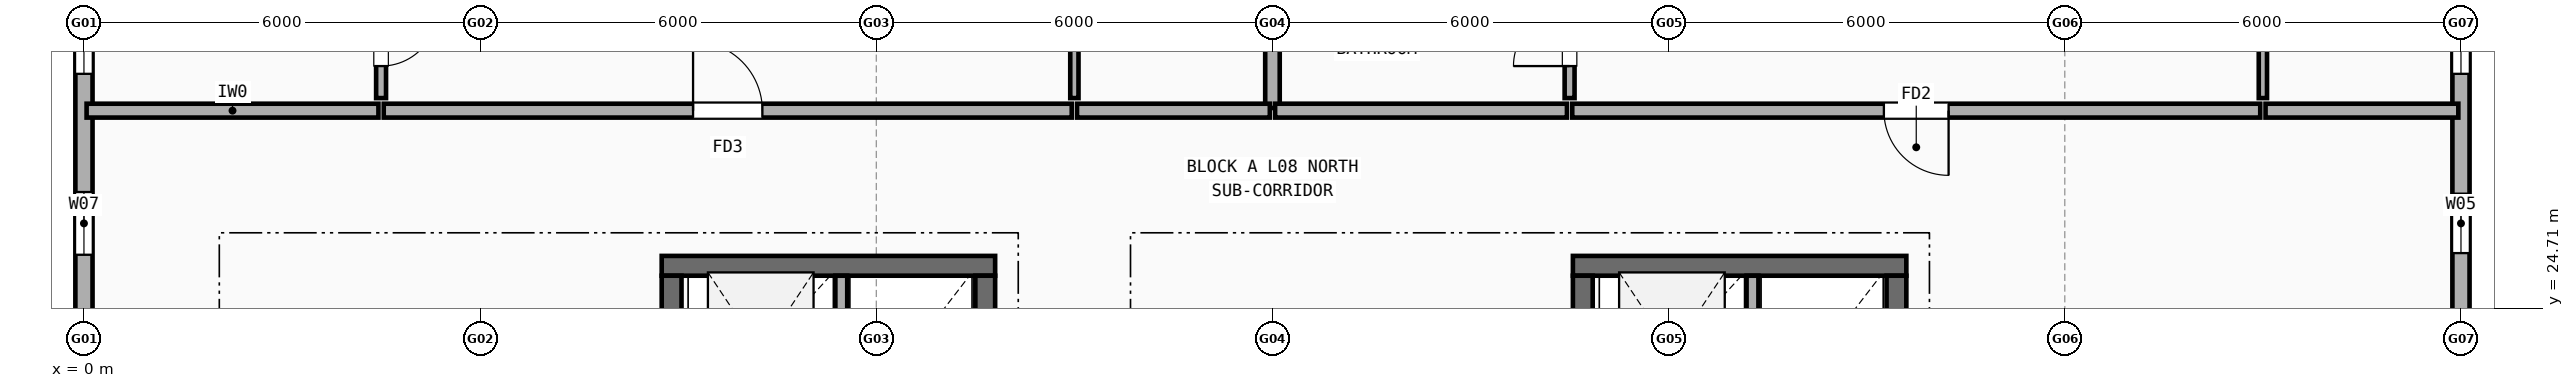
"""IFC4 building model, lengths in metres.
Left out: names, types, materials, properties, quantities, classifications, styles, units other than length and angle.
Written with IfcOpenShell. Run it as: python <this file> out.ifc"""

import sys

from ifc_helpers import new_model, si_unit, direction, frame, frame_2d, origin, place, context, subcontext, project, spatial, rectangle, extrude, element, fill, save


model = new_model("IFC4")
c1 = context("Model", 3, precision=1e-05, world=origin(), true_north=direction((0.0, 1.0)))
c2 = subcontext(c1, "Body", "Model", "MODEL_VIEW")
j1 = project(units=[si_unit("LENGTHUNIT", "METRE"), si_unit("PLANEANGLEUNIT", "RADIAN")], contexts=[c1])
p1 = place(None, origin())
s1 = spatial("IfcSite", under=j1, at=p1, CompositionType="ELEMENT")
p2 = place(p1, origin())
s2 = spatial("IfcBuilding", under=s1, at=p2, CompositionType="ELEMENT")
p3 = place(p2, frame((0.0, 0.0, 26.9)))
s3 = spatial("IfcBuildingStorey", under=s2, at=p3, CompositionType="ELEMENT", Elevation=26.9)
p4 = place(p3, frame((36.0, 24.325, 0.0), z_axis=(0.0, 0.0, 1.0), x_axis=(0.0, 1.0, 0.0)))
e1 = element("IfcWall", 1, at=p4, inside=s3, PredefinedType="STANDARD", context=c2, shape_type="SweptSolid", body=[
    extrude(rectangle(XDim=5.35, YDim=0.26, at=frame_2d((2.675, 0.0))), origin(), (0.0, 0.0, 1.0), 2.462),
])
p5 = place(p4, frame((1.218, 0.0, 0.9)))
e2 = element("IfcOpeningElement", 2, at=p5, cuts=e1, PredefinedType="OPENING", context=c2, shape_type="SweptSolid", body=[
    extrude(rectangle(XDim=0.9, YDim=1.4, at=frame_2d((0.45, 0.7))), frame((0.0, 0.14, 0.0), z_axis=(0.0, -1.0, 0.0), x_axis=(1.0, 0.0, 0.0)), (0.0, 0.0, 1.0), 0.28),
])
p6 = place(p4, frame((3.933, 0.0, 0.9)))
e3 = element("IfcOpeningElement", 3, at=p6, cuts=e1, PredefinedType="OPENING", context=c2, shape_type="SweptSolid", body=[
    extrude(rectangle(XDim=0.9, YDim=1.4, at=frame_2d((0.45, 0.7))), frame((0.0, 0.14, 0.0), z_axis=(0.0, -1.0, 0.0), x_axis=(1.0, 0.0, 0.0)), (0.0, 0.0, 1.0), 0.28),
])
p7 = place(p3, frame((0.0, 29.675, 0.0), z_axis=(0.0, 0.0, 1.0), x_axis=(0.0, -1.0, 0.0)))
e4 = element("IfcWall", 4, at=p7, inside=s3, PredefinedType="STANDARD", context=c2, shape_type="SweptSolid", body=[
    extrude(rectangle(XDim=5.35, YDim=0.26, at=frame_2d((2.675, 0.0))), origin(), (0.0, 0.0, 1.0), 2.462),
])
p8 = place(p7, frame((0.518, 0.0, 0.9)))
e5 = element("IfcOpeningElement", 5, at=p8, cuts=e4, PredefinedType="OPENING", context=c2, shape_type="SweptSolid", body=[
    extrude(rectangle(XDim=0.9, YDim=1.3, at=frame_2d((0.45, 0.65))), frame((0.0, 0.14, 0.0), z_axis=(0.0, -1.0, 0.0), x_axis=(1.0, 0.0, 0.0)), (0.0, 0.0, 1.0), 0.28),
])
p9 = place(p7, frame((3.208, 0.0, 0.9)))
e6 = element("IfcOpeningElement", 6, at=p9, cuts=e4, PredefinedType="OPENING", context=c2, shape_type="SweptSolid", body=[
    extrude(rectangle(XDim=0.95, YDim=1.35, at=frame_2d((0.475, 0.675))), frame((0.0, 0.14, 0.0), z_axis=(0.0, -1.0, 0.0), x_axis=(1.0, 0.0, 0.0)), (0.0, 0.0, 1.0), 0.28),
])
p10 = place(p3, frame((13.8, 25.35, 0.0), z_axis=(0.0, 0.0, 1.0), x_axis=(-1.0, 0.0, 0.0)))
e7 = element("IfcWall", 7, at=p10, inside=s3, PredefinedType="SHEAR", context=c2, shape_type="SweptSolid", body=[
    extrude(rectangle(XDim=5.05, YDim=0.3, at=frame_2d((2.525, 0.0))), origin(), (0.0, 0.0, 1.0), 2.98),
])
p11 = place(p3, frame((13.65, 18.75, 0.0), z_axis=(0.0, 0.0, 1.0), x_axis=(0.0, 1.0, 0.0)))
e8 = element("IfcWall", 8, at=p11, inside=s3, PredefinedType="SHEAR", context=c2, shape_type="SweptSolid", body=[
    extrude(rectangle(XDim=6.45, YDim=0.3, at=frame_2d((3.225, 0.0))), origin(), (0.0, 0.0, 1.0), 2.98),
])
p12 = place(p3, frame((8.9, 21.75, 0.0), z_axis=(0.0, 0.0, 1.0), x_axis=(0.0, 1.0, 0.0)))
e9 = element("IfcWall", 9, at=p12, inside=s3, PredefinedType="SHEAR", context=c2, shape_type="SweptSolid", body=[
    extrude(rectangle(XDim=3.45, YDim=0.3, at=frame_2d((1.725, 0.0))), origin(), (0.0, 0.0, 1.0), 2.98),
])
p13 = place(p3, frame((11.47, 22.94, 0.0), z_axis=(0.0, 0.0, 1.0), x_axis=(0.0, 1.0, 0.0)))
e10 = element("IfcWall", 10, at=p13, inside=s3, PredefinedType="SOLIDWALL", context=c2, shape_type="SweptSolid", body=[
    extrude(rectangle(XDim=2.26, YDim=0.18, at=frame_2d((1.13, 0.0))), origin(), (0.0, 0.0, 1.0), 2.98),
])
p14 = place(p3, frame((27.6, 25.35, 0.0), z_axis=(0.0, 0.0, 1.0), x_axis=(-1.0, 0.0, 0.0)))
e11 = element("IfcWall", 11, at=p14, inside=s3, PredefinedType="SHEAR", context=c2, shape_type="SweptSolid", body=[
    extrude(rectangle(XDim=5.05, YDim=0.3, at=frame_2d((2.525, 0.0))), origin(), (0.0, 0.0, 1.0), 2.98),
])
p15 = place(p3, frame((27.45, 18.75, 0.0), z_axis=(0.0, 0.0, 1.0), x_axis=(0.0, 1.0, 0.0)))
e12 = element("IfcWall", 12, at=p15, inside=s3, PredefinedType="SHEAR", context=c2, shape_type="SweptSolid", body=[
    extrude(rectangle(XDim=6.45, YDim=0.3, at=frame_2d((3.225, 0.0))), origin(), (0.0, 0.0, 1.0), 2.98),
])
p16 = place(p3, frame((22.7, 21.75, 0.0), z_axis=(0.0, 0.0, 1.0), x_axis=(0.0, 1.0, 0.0)))
e13 = element("IfcWall", 13, at=p16, inside=s3, PredefinedType="SHEAR", context=c2, shape_type="SweptSolid", body=[
    extrude(rectangle(XDim=3.45, YDim=0.3, at=frame_2d((1.725, 0.0))), origin(), (0.0, 0.0, 1.0), 2.98),
])
p17 = place(p3, frame((25.27, 22.94, 0.0), z_axis=(0.0, 0.0, 1.0), x_axis=(0.0, 1.0, 0.0)))
e14 = element("IfcWall", 14, at=p17, inside=s3, PredefinedType="SOLIDWALL", context=c2, shape_type="SweptSolid", body=[
    extrude(rectangle(XDim=2.26, YDim=0.18, at=frame_2d((1.13, 0.0))), origin(), (0.0, 0.0, 1.0), 2.98),
])
p18 = place(p3, frame((18.0, 27.74, 0.0), z_axis=(0.0, 0.0, 1.0), x_axis=(0.0, 1.0, 0.0)))
e15 = element("IfcWall", 15, at=p18, inside=s3, PredefinedType="SOLIDWALL", context=c2, shape_type="SweptSolid", body=[
    extrude(rectangle(XDim=7.87, YDim=0.22, at=frame_2d((3.935, 0.0))), origin(), (0.0, 0.0, 1.0), 2.458),
])
p19 = place(p3, frame((0.04, 27.7, 0.0), z_axis=(0.0, 0.0, 1.0), x_axis=(1.0, 0.0, 0.0)))
e16 = element("IfcWall", 16, at=p19, inside=s3, PredefinedType="SOLIDWALL", context=c2, shape_type="SweptSolid", body=[
    extrude(rectangle(XDim=4.42, YDim=0.21, at=frame_2d((2.21, 0.0))), origin(), (0.0, 0.0, 1.0), 2.462),
])
p20 = place(p3, frame((4.54, 27.7, 0.0), z_axis=(0.0, 0.0, 1.0), x_axis=(1.0, 0.0, 0.0)))
e17 = element("IfcWall", 17, at=p20, inside=s3, PredefinedType="SOLIDWALL", context=c2, shape_type="SweptSolid", body=[
    extrude(rectangle(XDim=10.42, YDim=0.21, at=frame_2d((5.21, 0.0))), origin(), (0.0, 0.0, 1.0), 2.508),
])
p21 = place(p20, frame((4.685, 0.0, 0.0)))
e18 = element("IfcOpeningElement", 18, at=p21, cuts=e17, PredefinedType="OPENING", context=c2, shape_type="SweptSolid", body=[
    extrude(rectangle(XDim=1.05, YDim=2.15, at=frame_2d((0.525, 1.075))), frame((0.0, 0.115, 0.0), z_axis=(0.0, -1.0, 0.0), x_axis=(1.0, 0.0, 0.0)), (0.0, 0.0, 1.0), 0.23),
])
p22 = place(p3, frame((4.5, 27.89, 0.0), z_axis=(0.0, 0.0, 1.0), x_axis=(0.0, 1.0, 0.0)))
e19 = element("IfcWall", 19, at=p22, inside=s3, PredefinedType="PARTITIONING", context=c2, shape_type="SweptSolid", body=[
    extrude(rectangle(XDim=1.82, YDim=0.15, at=frame_2d((0.91, 0.0))), origin(), (0.0, 0.0, 1.0), 2.98),
])
p23 = place(p22, frame((0.485, 0.0, 0.0)))
e20 = element("IfcOpeningElement", 20, at=p23, cuts=e19, PredefinedType="OPENING", context=c2, shape_type="SweptSolid", body=[
    extrude(rectangle(XDim=0.85, YDim=2.1, at=frame_2d((0.425, 1.05))), frame((0.0, 0.085, 0.0), z_axis=(0.0, -1.0, 0.0), x_axis=(1.0, 0.0, 0.0)), (0.0, 0.0, 1.0), 0.17),
])
p24 = place(p3, frame((15.04, 27.7, 0.0), z_axis=(0.0, 0.0, 1.0), x_axis=(1.0, 0.0, 0.0)))
e21 = element("IfcWall", 21, at=p24, inside=s3, PredefinedType="SOLIDWALL", context=c2, shape_type="SweptSolid", body=[
    extrude(rectangle(XDim=2.92, YDim=0.21, at=frame_2d((1.46, 0.0))), origin(), (0.0, 0.0, 1.0), 2.98),
])
p25 = place(p3, frame((15.0, 27.89, 0.0), z_axis=(0.0, 0.0, 1.0), x_axis=(0.0, 1.0, 0.0)))
e22 = element("IfcWall", 22, at=p25, inside=s3, PredefinedType="PARTITIONING", context=c2, shape_type="SweptSolid", body=[
    extrude(rectangle(XDim=7.92, YDim=0.125, at=frame_2d((3.96, 0.0))), origin(), (0.0, 0.0, 1.0), 2.462),
])
p26 = place(p25, frame((3.65, 0.0, 0.0)))
e23 = element("IfcOpeningElement", 23, at=p26, cuts=e22, PredefinedType="OPENING", context=c2, shape_type="SweptSolid", body=[
    extrude(rectangle(XDim=0.88, YDim=2.1, at=frame_2d((0.44, 1.05))), frame((0.0, 0.073, 0.0), z_axis=(0.0, -1.0, 0.0), x_axis=(1.0, 0.0, 0.0)), (0.0, 0.0, 1.0), 0.145),
])
p27 = place(p3, frame((18.04, 27.7, 0.0), z_axis=(0.0, 0.0, 1.0), x_axis=(1.0, 0.0, 0.0)))
e24 = element("IfcWall", 24, at=p27, inside=s3, PredefinedType="SOLIDWALL", context=c2, shape_type="SweptSolid", body=[
    extrude(rectangle(XDim=4.42, YDim=0.21, at=frame_2d((2.21, 0.0))), origin(), (0.0, 0.0, 1.0), 2.98),
])
p28 = place(p3, frame((22.54, 27.7, 0.0), z_axis=(0.0, 0.0, 1.0), x_axis=(1.0, 0.0, 0.0)))
e25 = element("IfcWall", 25, at=p28, inside=s3, PredefinedType="SOLIDWALL", context=c2, shape_type="SweptSolid", body=[
    extrude(rectangle(XDim=10.42, YDim=0.21, at=frame_2d((5.21, 0.0))), origin(), (0.0, 0.0, 1.0), 2.462),
])
p29 = place(p28, frame((4.72, 0.0, 0.0)))
e26 = element("IfcOpeningElement", 26, at=p29, cuts=e25, PredefinedType="OPENING", context=c2, shape_type="SweptSolid", body=[
    extrude(rectangle(XDim=0.98, YDim=2.15, at=frame_2d((0.49, 1.075))), frame((0.0, 0.115, 0.0), z_axis=(0.0, -1.0, 0.0), x_axis=(1.0, 0.0, 0.0)), (0.0, 0.0, 1.0), 0.23),
])
p30 = place(p3, frame((22.5, 27.89, 0.0), z_axis=(0.0, 0.0, 1.0), x_axis=(0.0, 1.0, 0.0)))
e27 = element("IfcWall", 27, at=p30, inside=s3, PredefinedType="PARTITIONING", context=c2, shape_type="SweptSolid", body=[
    extrude(rectangle(XDim=1.82, YDim=0.15, at=frame_2d((0.91, 0.0))), origin(), (0.0, 0.0, 1.0), 2.98),
])
p31 = place(p30, frame((0.485, 0.0, 0.0)))
e28 = element("IfcOpeningElement", 28, at=p31, cuts=e27, PredefinedType="OPENING", context=c2, shape_type="SweptSolid", body=[
    extrude(rectangle(XDim=0.85, YDim=2.1, at=frame_2d((0.425, 1.05))), frame((0.0, 0.085, 0.0), z_axis=(0.0, -1.0, 0.0), x_axis=(1.0, 0.0, 0.0)), (0.0, 0.0, 1.0), 0.17),
])
p32 = place(p3, frame((33.04, 27.7, 0.0), z_axis=(0.0, 0.0, 1.0), x_axis=(1.0, 0.0, 0.0)))
e29 = element("IfcWall", 29, at=p32, inside=s3, PredefinedType="SOLIDWALL", context=c2, shape_type="SweptSolid", body=[
    extrude(rectangle(XDim=2.92, YDim=0.21, at=frame_2d((1.46, 0.0))), origin(), (0.0, 0.0, 1.0), 2.462),
])
p33 = place(p3, frame((33.0, 27.89, 0.0), z_axis=(0.0, 0.0, 1.0), x_axis=(0.0, 1.0, 0.0)))
e30 = element("IfcWall", 30, at=p33, inside=s3, PredefinedType="PARTITIONING", context=c2, shape_type="SweptSolid", body=[
    extrude(rectangle(XDim=7.92, YDim=0.125, at=frame_2d((3.96, 0.0))), origin(), (0.0, 0.0, 1.0), 2.462),
])
p34 = place(p33, frame((3.65, 0.0, 0.0)))
e31 = element("IfcOpeningElement", 31, at=p34, cuts=e30, PredefinedType="OPENING", context=c2, shape_type="SweptSolid", body=[
    extrude(rectangle(XDim=0.9, YDim=2.1, at=frame_2d((0.45, 1.05))), frame((0.0, 0.073, 0.0), z_axis=(0.0, -1.0, 0.0), x_axis=(1.0, 0.0, 0.0)), (0.0, 0.0, 1.0), 0.145),
])
p35 = place(p5, origin())
e32 = element("IfcWindow", 32, at=p35, inside=s3, PartitioningType="SINGLE_PANEL", PredefinedType="WINDOW", context=c2, shape_type="SweptSolid", body=[
    extrude(rectangle(XDim=0.9, YDim=1.4, at=frame_2d((0.45, 0.7))), frame((0.0, 0.03, 0.0), z_axis=(0.0, -1.0, 0.0), x_axis=(1.0, 0.0, 0.0)), (0.0, 0.0, 1.0), 0.06),
])
fill(e2, e32)
p36 = place(p6, origin())
e33 = element("IfcWindow", 33, at=p36, inside=s3, PartitioningType="SINGLE_PANEL", PredefinedType="WINDOW", context=c2, shape_type="SweptSolid", body=[
    extrude(rectangle(XDim=0.9, YDim=1.4, at=frame_2d((0.45, 0.7))), frame((0.0, 0.03, 0.0), z_axis=(0.0, -1.0, 0.0), x_axis=(1.0, 0.0, 0.0)), (0.0, 0.0, 1.0), 0.06),
])
fill(e3, e33)
p37 = place(p8, origin())
e34 = element("IfcWindow", 34, at=p37, inside=s3, PartitioningType="SINGLE_PANEL", PredefinedType="WINDOW", context=c2, shape_type="SweptSolid", body=[
    extrude(rectangle(XDim=0.9, YDim=1.3, at=frame_2d((0.45, 0.65))), frame((0.0, 0.03, 0.0), z_axis=(0.0, -1.0, 0.0), x_axis=(1.0, 0.0, 0.0)), (0.0, 0.0, 1.0), 0.06),
])
fill(e5, e34)
p38 = place(p9, origin())
e35 = element("IfcWindow", 35, at=p38, inside=s3, PartitioningType="SINGLE_PANEL", PredefinedType="WINDOW", context=c2, shape_type="SweptSolid", body=[
    extrude(rectangle(XDim=0.95, YDim=1.35, at=frame_2d((0.475, 0.675))), frame((0.0, 0.03, 0.0), z_axis=(0.0, -1.0, 0.0), x_axis=(1.0, 0.0, 0.0)), (0.0, 0.0, 1.0), 0.06),
])
fill(e6, e35)
p39 = place(p21, origin())
e36 = element("IfcDoor", 36, at=p39, inside=s3, OperationType="SINGLE_SWING_LEFT", PredefinedType="DOOR", context=c2, shape_type="SweptSolid", body=[
    extrude(rectangle(XDim=1.05, YDim=2.15, at=frame_2d((0.525, 1.075))), frame((0.0, 0.025, 0.0), z_axis=(0.0, -1.0, 0.0), x_axis=(1.0, 0.0, 0.0)), (0.0, 0.0, 1.0), 0.05),
])
fill(e18, e36)
p40 = place(p23, origin())
e37 = element("IfcDoor", 37, at=p40, inside=s3, OperationType="SINGLE_SWING_RIGHT", PredefinedType="DOOR", context=c2, shape_type="SweptSolid", body=[
    extrude(rectangle(XDim=0.85, YDim=2.1, at=frame_2d((0.425, 1.05))), frame((0.0, 0.025, 0.0), z_axis=(0.0, -1.0, 0.0), x_axis=(1.0, 0.0, 0.0)), (0.0, 0.0, 1.0), 0.05),
])
fill(e20, e37)
p41 = place(p29, origin())
e38 = element("IfcDoor", 38, at=p41, inside=s3, OperationType="SINGLE_SWING_RIGHT", PredefinedType="DOOR", context=c2, shape_type="SweptSolid", body=[
    extrude(rectangle(XDim=0.98, YDim=2.15, at=frame_2d((0.49, 1.075))), frame((0.0, 0.025, 0.0), z_axis=(0.0, -1.0, 0.0), x_axis=(1.0, 0.0, 0.0)), (0.0, 0.0, 1.0), 0.05),
])
fill(e26, e38)
p42 = place(p31, origin())
e39 = element("IfcDoor", 39, at=p42, inside=s3, OperationType="SINGLE_SWING_LEFT", PredefinedType="DOOR", context=c2, shape_type="SweptSolid", body=[
    extrude(rectangle(XDim=0.85, YDim=2.1, at=frame_2d((0.425, 1.05))), frame((0.0, 0.025, 0.0), z_axis=(0.0, -1.0, 0.0), x_axis=(1.0, 0.0, 0.0)), (0.0, 0.0, 1.0), 0.05),
])
fill(e28, e39)
save(model, sys.argv[1])
